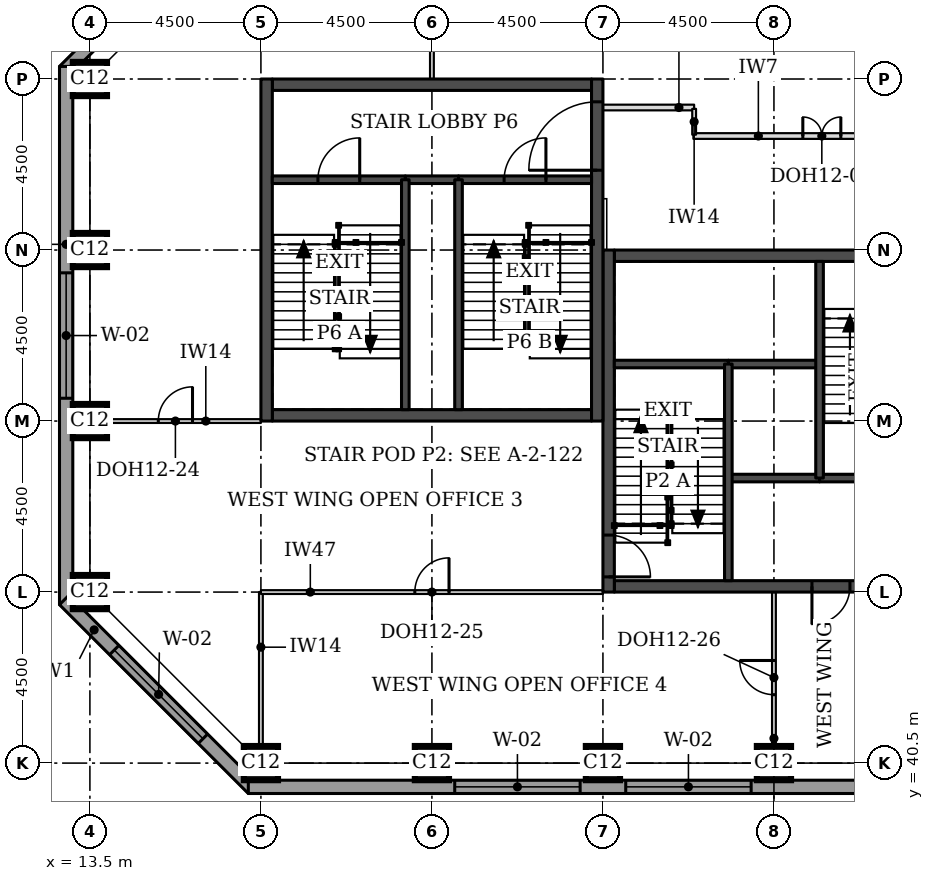
"""IFC4 building model, lengths in metres.
Left out: names, types, materials, properties, quantities, classifications, styles, units other than length and angle.
Written with IfcOpenShell. Run it as: python <this file> out.ifc"""

import sys

from ifc_helpers import new_model, si_unit, direction, frame, frame_2d, origin, origin_2d, place, context, subcontext, project, spatial, rectangle, extrude, element, fill, save


model = new_model("IFC4")
c1 = context("Model", 3, precision=1e-05, world=origin(), true_north=direction((0.0, 1.0)))
c2 = subcontext(c1, "Body", "Model", "MODEL_VIEW")
j1 = project(units=[si_unit("LENGTHUNIT", "METRE"), si_unit("PLANEANGLEUNIT", "RADIAN")], contexts=[c1])
p1 = place(None, origin())
s1 = spatial("IfcSite", under=j1, at=p1, CompositionType="ELEMENT")
p2 = place(p1, origin())
s2 = spatial("IfcBuilding", under=s1, at=p2, CompositionType="ELEMENT")
p3 = place(p2, frame((0.0, 0.0, 245.2)))
s3 = spatial("IfcBuildingStorey", under=s2, at=p3, CompositionType="ELEMENT", Elevation=245.2)
for number, where, z_axis, x_axis in (
    (1, (18.0, 40.5, 0.0), (0.0, 0.0, 1.0), (1.0, 0.0, 0.0)),
    (2, (22.5, 40.5, 0.0), (0.0, 0.0, 1.0), (1.0, 0.0, 0.0)),
    (3, (27.0, 40.5, 0.0), (0.0, 0.0, 1.0), (1.0, 0.0, 0.0)),
    (4, (31.5, 40.5, 0.0), (0.0, 0.0, 1.0), (1.0, 0.0, 0.0)),
    (5, (13.5, 45.0, 0.0), (0.0, 0.0, 1.0), (1.0, 0.0, 0.0)),
    (6, (13.5, 49.5, 0.0), (0.0, 0.0, 1.0), (1.0, 0.0, 0.0)),
    (7, (13.5, 54.0, 0.0), (0.0, 0.0, 1.0), (1.0, 0.0, 0.0)),
    (8, (13.5, 58.5, 0.0), (0.0, 0.0, 1.0), (1.0, 0.0, 0.0)),
):
    element("IfcColumn", number, at=place(p3, frame(where, z_axis=z_axis, x_axis=x_axis)), inside=s3, PredefinedType="COLUMN", context=c2, shape_type="SweptSolid", body=[
        extrude(rectangle(XDim=0.9, YDim=0.9, at=origin_2d()), origin(), (0.0, 0.0, 1.0), 3.7),
    ])
p4 = place(p3, frame((27.3, 45.15, 0.0), z_axis=(0.0, 0.0, 1.0), x_axis=(1.0, 0.0, 0.0)))
e9 = element("IfcWall", 9, at=p4, inside=s3, PredefinedType="SHEAR", context=c2, shape_type="SweptSolid", body=[
    extrude(rectangle(XDim=8.4, YDim=0.3, at=frame_2d((4.2, 0.0))), origin(), (0.0, 0.0, 1.0), 3.7),
])
p5 = place(p4, frame((5.2, 0.0, 0.0)))
e10 = element("IfcOpeningElement", 10, at=p5, cuts=e9, PredefinedType="OPENING", context=c2, shape_type="SweptSolid", body=[
    extrude(rectangle(XDim=1.0, YDim=2.1, at=frame_2d((0.5, 1.05))), frame((0.0, 0.16, 0.0), z_axis=(0.0, -1.0, 0.0), x_axis=(1.0, 0.0, 0.0)), (0.0, 0.0, 1.0), 0.32),
])
p6 = place(p3, frame((27.3, 53.85, 0.0), z_axis=(0.0, 0.0, 1.0), x_axis=(1.0, 0.0, 0.0)))
e11 = element("IfcWall", 11, at=p6, inside=s3, PredefinedType="SHEAR", context=c2, shape_type="SweptSolid", body=[
    extrude(rectangle(XDim=8.4, YDim=0.3, at=frame_2d((4.2, 0.0))), origin(), (0.0, 0.0, 1.0), 3.7),
])
p7 = place(p6, frame((6.4, 0.0, 0.0)))
e12 = element("IfcOpeningElement", 12, at=p7, cuts=e11, PredefinedType="OPENING", context=c2, shape_type="SweptSolid", body=[
    extrude(rectangle(XDim=1.1, YDim=2.1, at=frame_2d((0.55, 1.05))), frame((0.0, 0.16, 0.0), z_axis=(0.0, -1.0, 0.0), x_axis=(1.0, 0.0, 0.0)), (0.0, 0.0, 1.0), 0.32),
])
p8 = place(p3, frame((27.15, 45.0, 0.0), z_axis=(0.0, 0.0, 1.0), x_axis=(0.0, 1.0, 0.0)))
e13 = element("IfcWall", 13, at=p8, inside=s3, PredefinedType="SHEAR", context=c2, shape_type="SweptSolid", body=[
    extrude(rectangle(XDim=9.0, YDim=0.3, at=frame_2d((4.5, 0.0))), origin(), (0.0, 0.0, 1.0), 3.7),
])
p9 = place(p8, frame((0.4, 0.0, 0.0)))
e14 = element("IfcOpeningElement", 14, at=p9, cuts=e13, PredefinedType="OPENING", context=c2, shape_type="SweptSolid", body=[
    extrude(rectangle(XDim=1.1, YDim=2.1, at=frame_2d((0.55, 1.05))), frame((0.0, 0.16, 0.0), z_axis=(0.0, -1.0, 0.0), x_axis=(1.0, 0.0, 0.0)), (0.0, 0.0, 1.0), 0.32),
])
for number, where, z_axis, x_axis in (
    (15, (18.3, 49.65, 0.0), (0.0, 0.0, 1.0), (1.0, 0.0, 0.0)),
    (16, (18.3, 58.35, 0.0), (0.0, 0.0, 1.0), (1.0, 0.0, 0.0)),
):
    element("IfcWall", number, at=place(p3, frame(where, z_axis=z_axis, x_axis=x_axis)), inside=s3, PredefinedType="SHEAR", context=c2, shape_type="SweptSolid", body=[
        extrude(rectangle(XDim=8.4, YDim=0.3, at=frame_2d((4.2, 0.0))), origin(), (0.0, 0.0, 1.0), 3.7),
    ])
p10 = place(p3, frame((18.15, 49.5, 0.0), z_axis=(0.0, 0.0, 1.0), x_axis=(0.0, 1.0, 0.0)))
e17 = element("IfcWall", 17, at=p10, inside=s3, PredefinedType="SHEAR", context=c2, shape_type="SweptSolid", body=[
    extrude(rectangle(XDim=9.0, YDim=0.3, at=frame_2d((4.5, 0.0))), origin(), (0.0, 0.0, 1.0), 3.7),
])
p11 = place(p3, frame((26.85, 49.5, 0.0), z_axis=(0.0, 0.0, 1.0), x_axis=(0.0, 1.0, 0.0)))
e18 = element("IfcWall", 18, at=p11, inside=s3, PredefinedType="SHEAR", context=c2, shape_type="SweptSolid", body=[
    extrude(rectangle(XDim=9.0, YDim=0.3, at=frame_2d((4.5, 0.0))), origin(), (0.0, 0.0, 1.0), 3.7),
])
p12 = place(p11, frame((6.6, 0.0, 0.0)))
e19 = element("IfcOpeningElement", 19, at=p12, cuts=e18, PredefinedType="OPENING", context=c2, shape_type="SweptSolid", body=[
    extrude(rectangle(XDim=1.8, YDim=2.1, at=frame_2d((0.9, 1.05))), frame((0.0, 0.16, 0.0), z_axis=(0.0, -1.0, 0.0), x_axis=(1.0, 0.0, 0.0)), (0.0, 0.0, 1.0), 0.32),
])
p13 = place(p3, frame((17.792, 63.676, 0.0), z_axis=(0.0, 0.0, 1.0), x_axis=(-0.707106781187, -0.707106781187, 0.0)))
e20 = element("IfcWall", 20, at=p13, inside=s3, PredefinedType="STANDARD", context=c2, shape_type="SweptSolid", body=[
    extrude(rectangle(XDim=7.027, YDim=0.35, at=frame_2d((3.513, 0.0))), origin(), (0.0, 0.0, 1.0), 3.525),
])
p14 = place(p13, frame((1.863, 0.0, 0.9)))
e21 = element("IfcOpeningElement", 21, at=p14, cuts=e20, PredefinedType="OPENING", context=c2, shape_type="SweptSolid", body=[
    extrude(rectangle(XDim=3.3, YDim=1.9, at=frame_2d((1.65, 0.95))), frame((0.0, 0.185, 0.0), z_axis=(0.0, -1.0, 0.0), x_axis=(1.0, 0.0, 0.0)), (0.0, 0.0, 1.0), 0.37),
])
p15 = place(p3, frame((12.875, 58.831, 0.0), z_axis=(0.0, 0.0, 1.0), x_axis=(0.0, -1.0, 0.0)))
e22 = element("IfcWall", 22, at=p15, inside=s3, PredefinedType="STANDARD", context=c2, shape_type="SweptSolid", body=[
    extrude(rectangle(XDim=14.163, YDim=0.35, at=frame_2d((7.081, 0.0))), origin(), (0.0, 0.0, 1.0), 3.525),
])
p16 = place(p15, frame((5.431, 0.0, 0.9)))
e23 = element("IfcOpeningElement", 23, at=p16, cuts=e22, PredefinedType="OPENING", context=c2, shape_type="SweptSolid", body=[
    extrude(rectangle(XDim=3.3, YDim=1.9, at=frame_2d((1.65, 0.95))), frame((0.0, 0.185, 0.0), z_axis=(0.0, -1.0, 0.0), x_axis=(1.0, 0.0, 0.0)), (0.0, 0.0, 1.0), 0.37),
])
p17 = place(p3, frame((12.824, 44.792, 0.0), z_axis=(0.0, 0.0, 1.0), x_axis=(0.707106781187, -0.707106781187, 0.0)))
e24 = element("IfcWall", 24, at=p17, inside=s3, PredefinedType="STANDARD", context=c2, shape_type="SweptSolid", body=[
    extrude(rectangle(XDim=7.027, YDim=0.35, at=frame_2d((3.513, 0.0))), origin(), (0.0, 0.0, 1.0), 3.525),
])
p18 = place(p17, frame((1.863, 0.0, 0.9)))
e25 = element("IfcOpeningElement", 25, at=p18, cuts=e24, PredefinedType="OPENING", context=c2, shape_type="SweptSolid", body=[
    extrude(rectangle(XDim=3.3, YDim=1.9, at=frame_2d((1.65, 0.95))), frame((0.0, 0.185, 0.0), z_axis=(0.0, -1.0, 0.0), x_axis=(1.0, 0.0, 0.0)), (0.0, 0.0, 1.0), 0.37),
])
p19 = place(p3, frame((17.669, 39.875, 0.0), z_axis=(0.0, 0.0, 1.0), x_axis=(1.0, 0.0, 0.0)))
e26 = element("IfcWall", 26, at=p19, inside=s3, PredefinedType="STANDARD", context=c2, shape_type="SweptSolid", body=[
    extrude(rectangle(XDim=18.331, YDim=0.35, at=frame_2d((9.166, 0.0))), origin(), (0.0, 0.0, 1.0), 3.525),
])
p20 = place(p19, frame((5.431, 0.0, 0.9)))
e27 = element("IfcOpeningElement", 27, at=p20, cuts=e26, PredefinedType="OPENING", context=c2, shape_type="SweptSolid", body=[
    extrude(rectangle(XDim=3.3, YDim=1.9, at=frame_2d((1.65, 0.95))), frame((0.0, 0.185, 0.0), z_axis=(0.0, -1.0, 0.0), x_axis=(1.0, 0.0, 0.0)), (0.0, 0.0, 1.0), 0.37),
])
p21 = place(p19, frame((9.931, 0.0, 0.9)))
e28 = element("IfcOpeningElement", 28, at=p21, cuts=e26, PredefinedType="OPENING", context=c2, shape_type="SweptSolid", body=[
    extrude(rectangle(XDim=3.3, YDim=1.9, at=frame_2d((1.65, 0.95))), frame((0.0, 0.185, 0.0), z_axis=(0.0, -1.0, 0.0), x_axis=(1.0, 0.0, 0.0)), (0.0, 0.0, 1.0), 0.37),
])
p22 = place(p3, frame((29.38, 57.0, 0.0), z_axis=(0.0, 0.0, 1.0), x_axis=(1.0, 0.0, 0.0)))
e29 = element("IfcWall", 29, at=p22, inside=s3, PredefinedType="PARTITIONING", context=c2, shape_type="SweptSolid", body=[
    extrude(rectangle(XDim=6.62, YDim=0.15, at=frame_2d((3.31, 0.0))), origin(), (0.0, 0.0, 1.0), 3.55),
])
p23 = place(p22, frame((2.88, 0.0, 0.0)))
e30 = element("IfcOpeningElement", 30, at=p23, cuts=e29, PredefinedType="OPENING", context=c2, shape_type="SweptSolid", body=[
    extrude(rectangle(XDim=1.0, YDim=2.1, at=frame_2d((0.5, 1.05))), frame((0.0, 0.085, 0.0), z_axis=(0.0, -1.0, 0.0), x_axis=(1.0, 0.0, 0.0)), (0.0, 0.0, 1.0), 0.17),
])
p24 = place(p3, frame((22.5, 63.0, 0.0), z_axis=(0.0, 0.0, 1.0), x_axis=(0.0, -1.0, 0.0)))
e31 = element("IfcWall", 31, at=p24, inside=s3, PredefinedType="PARTITIONING", context=c2, shape_type="SweptSolid", body=[
    extrude(rectangle(XDim=4.5, YDim=0.1, at=frame_2d((2.25, 0.0))), origin(), (0.0, 0.0, 1.0), 3.55),
])
p25 = place(p24, frame((1.8, 0.0, 0.0)))
e32 = element("IfcOpeningElement", 32, at=p25, cuts=e31, PredefinedType="OPENING", context=c2, shape_type="SweptSolid", body=[
    extrude(rectangle(XDim=0.9, YDim=2.1, at=frame_2d((0.45, 1.05))), frame((0.0, 0.06, 0.0), z_axis=(0.0, -1.0, 0.0), x_axis=(1.0, 0.0, 0.0)), (0.0, 0.0, 1.0), 0.12),
])
p26 = place(p3, frame((13.5, 49.5, 0.0), z_axis=(0.0, 0.0, 1.0), x_axis=(1.0, 0.0, 0.0)))
e33 = element("IfcWall", 33, at=p26, inside=s3, PredefinedType="PARTITIONING", context=c2, shape_type="SweptSolid", body=[
    extrude(rectangle(XDim=4.5, YDim=0.1, at=frame_2d((2.25, 0.0))), origin(), (0.0, 0.0, 1.0), 3.55),
])
p27 = place(p26, frame((1.8, 0.0, 0.0)))
e34 = element("IfcOpeningElement", 34, at=p27, cuts=e33, PredefinedType="OPENING", context=c2, shape_type="SweptSolid", body=[
    extrude(rectangle(XDim=0.9, YDim=2.1, at=frame_2d((0.45, 1.05))), frame((0.0, 0.06, 0.0), z_axis=(0.0, -1.0, 0.0), x_axis=(1.0, 0.0, 0.0)), (0.0, 0.0, 1.0), 0.12),
])
p28 = place(p3, frame((18.0, 40.5, 0.0), z_axis=(0.0, 0.0, 1.0), x_axis=(0.0, 1.0, 0.0)))
e35 = element("IfcWall", 35, at=p28, inside=s3, PredefinedType="PARTITIONING", context=c2, shape_type="SweptSolid", body=[
    extrude(rectangle(XDim=4.5, YDim=0.1, at=frame_2d((2.25, 0.0))), origin(), (0.0, 0.0, 1.0), 3.55),
])
p29 = place(p3, frame((18.0, 45.0, 0.0), z_axis=(0.0, 0.0, 1.0), x_axis=(1.0, 0.0, 0.0)))
e36 = element("IfcWall", 36, at=p29, inside=s3, PredefinedType="PARTITIONING", context=c2, shape_type="SweptSolid", body=[
    extrude(rectangle(XDim=9.0, YDim=0.1, at=frame_2d((4.5, 0.0))), origin(), (0.0, 0.0, 1.0), 2.55),
])
p30 = place(p29, frame((4.05, 0.0, 0.0)))
e37 = element("IfcOpeningElement", 37, at=p30, cuts=e36, PredefinedType="OPENING", context=c2, shape_type="SweptSolid", body=[
    extrude(rectangle(XDim=0.9, YDim=2.1, at=frame_2d((0.45, 1.05))), frame((0.0, 0.06, 0.0), z_axis=(0.0, -1.0, 0.0), x_axis=(1.0, 0.0, 0.0)), (0.0, 0.0, 1.0), 0.12),
])
p31 = place(p3, frame((31.5, 45.0, 0.0), z_axis=(0.0, 0.0, 1.0), x_axis=(0.0, -1.0, 0.0)))
e38 = element("IfcWall", 38, at=p31, inside=s3, PredefinedType="PARTITIONING", context=c2, shape_type="SweptSolid", body=[
    extrude(rectangle(XDim=4.5, YDim=0.1, at=frame_2d((2.25, 0.0))), origin(), (0.0, 0.0, 1.0), 3.55),
])
p32 = place(p31, frame((1.8, 0.0, 0.0)))
e39 = element("IfcOpeningElement", 39, at=p32, cuts=e38, PredefinedType="OPENING", context=c2, shape_type="SweptSolid", body=[
    extrude(rectangle(XDim=0.9, YDim=2.1, at=frame_2d((0.45, 1.05))), frame((0.0, 0.06, 0.0), z_axis=(0.0, -1.0, 0.0), x_axis=(1.0, 0.0, 0.0)), (0.0, 0.0, 1.0), 0.12),
])
p33 = place(p3, frame((27.0, 57.75, 0.0), z_axis=(0.0, 0.0, 1.0), x_axis=(1.0, 0.0, 0.0)))
e40 = element("IfcWall", 40, at=p33, inside=s3, PredefinedType="PARTITIONING", context=c2, shape_type="SweptSolid", body=[
    extrude(rectangle(XDim=2.4, YDim=0.15, at=frame_2d((1.2, 0.0))), origin(), (0.0, 0.0, 1.0), 3.55),
])
p34 = place(p3, frame((29.4, 57.715, 0.0), z_axis=(0.0, 0.0, 1.0), x_axis=(0.0, -1.0, 0.0)))
e41 = element("IfcWall", 41, at=p34, inside=s3, PredefinedType="PARTITIONING", context=c2, shape_type="SweptSolid", body=[
    extrude(rectangle(XDim=0.68, YDim=0.1, at=frame_2d((0.34, 0.0))), origin(), (0.0, 0.0, 1.0), 3.55),
])
p35 = place(p3, frame((30.3, 48.0, 0.0), z_axis=(0.0, 0.0, 1.0), x_axis=(1.0, 0.0, 0.0)))
e42 = element("IfcWall", 42, at=p35, inside=s3, PredefinedType="SOLIDWALL", context=c2, shape_type="SweptSolid", body=[
    extrude(rectangle(XDim=2.4, YDim=0.2, at=frame_2d((1.2, 0.0))), origin(), (0.0, 0.0, 1.0), 3.55),
])
p36 = place(p3, frame((32.7, 48.0, 0.0), z_axis=(0.0, 0.0, 1.0), x_axis=(1.0, 0.0, 0.0)))
e43 = element("IfcWall", 43, at=p36, inside=s3, PredefinedType="SOLIDWALL", context=c2, shape_type="SweptSolid", body=[
    extrude(rectangle(XDim=3.0, YDim=0.2, at=frame_2d((1.5, 0.0))), origin(), (0.0, 0.0, 1.0), 3.55),
])
p37 = place(p3, frame((30.3, 51.0, 0.0), z_axis=(0.0, 0.0, 1.0), x_axis=(1.0, 0.0, 0.0)))
e44 = element("IfcWall", 44, at=p37, inside=s3, PredefinedType="SOLIDWALL", context=c2, shape_type="SweptSolid", body=[
    extrude(rectangle(XDim=2.4, YDim=0.2, at=frame_2d((1.2, 0.0))), origin(), (0.0, 0.0, 1.0), 3.7),
])
p38 = place(p3, frame((27.3, 51.0, 0.0), z_axis=(0.0, 0.0, 1.0), x_axis=(1.0, 0.0, 0.0)))
e45 = element("IfcWall", 45, at=p38, inside=s3, PredefinedType="SOLIDWALL", context=c2, shape_type="SweptSolid", body=[
    extrude(rectangle(XDim=3.0, YDim=0.2, at=frame_2d((1.5, 0.0))), origin(), (0.0, 0.0, 1.0), 3.55),
])
for number, where, z_axis, x_axis in (
    (46, (30.3, 45.3, 0.0), (0.0, 0.0, 1.0), (0.0, 1.0, 0.0)),
    (47, (32.7, 48.0, 0.0), (0.0, 0.0, 1.0), (0.0, 1.0, 0.0)),
):
    element("IfcWall", number, at=place(p3, frame(where, z_axis=z_axis, x_axis=x_axis)), inside=s3, PredefinedType="SOLIDWALL", context=c2, shape_type="SweptSolid", body=[
        extrude(rectangle(XDim=5.7, YDim=0.2, at=frame_2d((2.85, 0.0))), origin(), (0.0, 0.0, 1.0), 3.55),
    ])
p39 = place(p3, frame((21.8, 55.85, 0.0), z_axis=(0.0, 0.0, 1.0), x_axis=(1.0, 0.0, 0.0)))
e48 = element("IfcWall", 48, at=p39, inside=s3, PredefinedType="SOLIDWALL", context=c2, shape_type="SweptSolid", body=[
    extrude(rectangle(XDim=1.4, YDim=0.2, at=frame_2d((0.7, 0.0))), origin(), (0.0, 0.0, 1.0), 3.55),
])
p40 = place(p3, frame((18.3, 55.85, 0.0), z_axis=(0.0, 0.0, 1.0), x_axis=(1.0, 0.0, 0.0)))
e49 = element("IfcWall", 49, at=p40, inside=s3, PredefinedType="SOLIDWALL", context=c2, shape_type="SweptSolid", body=[
    extrude(rectangle(XDim=3.5, YDim=0.2, at=frame_2d((1.75, 0.0))), origin(), (0.0, 0.0, 1.0), 3.55),
])
p41 = place(p40, frame((1.2, 0.0, 0.0)))
e50 = element("IfcOpeningElement", 50, at=p41, cuts=e49, PredefinedType="OPENING", context=c2, shape_type="SweptSolid", body=[
    extrude(rectangle(XDim=1.1, YDim=2.1, at=frame_2d((0.55, 1.05))), frame((0.0, 0.11, 0.0), z_axis=(0.0, -1.0, 0.0), x_axis=(1.0, 0.0, 0.0)), (0.0, 0.0, 1.0), 0.22),
])
p42 = place(p3, frame((23.2, 55.85, 0.0), z_axis=(0.0, 0.0, 1.0), x_axis=(1.0, 0.0, 0.0)))
e51 = element("IfcWall", 51, at=p42, inside=s3, PredefinedType="SOLIDWALL", context=c2, shape_type="SweptSolid", body=[
    extrude(rectangle(XDim=3.5, YDim=0.2, at=frame_2d((1.75, 0.0))), origin(), (0.0, 0.0, 1.0), 3.55),
])
p43 = place(p42, frame((1.2, 0.0, 0.0)))
e52 = element("IfcOpeningElement", 52, at=p43, cuts=e51, PredefinedType="OPENING", context=c2, shape_type="SweptSolid", body=[
    extrude(rectangle(XDim=1.1, YDim=2.1, at=frame_2d((0.55, 1.05))), frame((0.0, 0.11, 0.0), z_axis=(0.0, -1.0, 0.0), x_axis=(1.0, 0.0, 0.0)), (0.0, 0.0, 1.0), 0.22),
])
for number, where, z_axis, x_axis in (
    (53, (21.8, 49.8, 0.0), (0.0, 0.0, 1.0), (0.0, 1.0, 0.0)),
    (54, (23.2, 49.8, 0.0), (0.0, 0.0, 1.0), (0.0, 1.0, 0.0)),
):
    element("IfcWall", number, at=place(p3, frame(where, z_axis=z_axis, x_axis=x_axis)), inside=s3, PredefinedType="SOLIDWALL", context=c2, shape_type="SweptSolid", body=[
        extrude(rectangle(XDim=6.05, YDim=0.2, at=frame_2d((3.025, 0.0))), origin(), (0.0, 0.0, 1.0), 3.55),
    ])
p44 = place(p16, origin())
e55 = element("IfcWindow", 55, at=p44, inside=s3, PartitioningType="SINGLE_PANEL", PredefinedType="WINDOW", context=c2, shape_type="SweptSolid", body=[
    extrude(rectangle(XDim=3.3, YDim=1.9, at=frame_2d((1.65, 0.95))), frame((0.0, 0.085, 0.0), z_axis=(0.0, -1.0, 0.0), x_axis=(1.0, 0.0, 0.0)), (0.0, 0.0, 1.0), 0.06),
])
fill(e23, e55)
p45 = place(p18, origin())
e56 = element("IfcWindow", 56, at=p45, inside=s3, PartitioningType="SINGLE_PANEL", PredefinedType="WINDOW", context=c2, shape_type="SweptSolid", body=[
    extrude(rectangle(XDim=3.3, YDim=1.9, at=frame_2d((1.65, 0.95))), frame((0.0, 0.085, 0.0), z_axis=(0.0, -1.0, 0.0), x_axis=(1.0, 0.0, 0.0)), (0.0, 0.0, 1.0), 0.06),
])
fill(e25, e56)
p46 = place(p20, origin())
e57 = element("IfcWindow", 57, at=p46, inside=s3, PartitioningType="SINGLE_PANEL", PredefinedType="WINDOW", context=c2, shape_type="SweptSolid", body=[
    extrude(rectangle(XDim=3.3, YDim=1.9, at=frame_2d((1.65, 0.95))), frame((0.0, 0.085, 0.0), z_axis=(0.0, -1.0, 0.0), x_axis=(1.0, 0.0, 0.0)), (0.0, 0.0, 1.0), 0.06),
])
fill(e27, e57)
p47 = place(p21, origin())
e58 = element("IfcWindow", 58, at=p47, inside=s3, PartitioningType="SINGLE_PANEL", PredefinedType="WINDOW", context=c2, shape_type="SweptSolid", body=[
    extrude(rectangle(XDim=3.3, YDim=1.9, at=frame_2d((1.65, 0.95))), frame((0.0, 0.085, 0.0), z_axis=(0.0, -1.0, 0.0), x_axis=(1.0, 0.0, 0.0)), (0.0, 0.0, 1.0), 0.06),
])
fill(e28, e58)
p48 = place(p23, origin())
e59 = element("IfcDoor", 59, at=p48, inside=s3, OperationType="DOUBLE_DOOR_SINGLE_SWING", PredefinedType="DOOR", context=c2, shape_type="SweptSolid", body=[
    extrude(rectangle(XDim=1.0, YDim=2.1, at=frame_2d((0.5, 1.05))), frame((0.0, 0.025, 0.0), z_axis=(0.0, -1.0, 0.0), x_axis=(1.0, 0.0, 0.0)), (0.0, 0.0, 1.0), 0.05),
])
fill(e30, e59)
p49 = place(p27, origin())
e60 = element("IfcDoor", 60, at=p49, inside=s3, OperationType="SINGLE_SWING_RIGHT", PredefinedType="DOOR", context=c2, shape_type="SweptSolid", body=[
    extrude(rectangle(XDim=0.9, YDim=2.1, at=frame_2d((0.45, 1.05))), frame((0.0, 0.025, 0.0), z_axis=(0.0, -1.0, 0.0), x_axis=(1.0, 0.0, 0.0)), (0.0, 0.0, 1.0), 0.05),
])
fill(e34, e60)
p50 = place(p30, origin())
e61 = element("IfcDoor", 61, at=p50, inside=s3, OperationType="SINGLE_SWING_RIGHT", PredefinedType="DOOR", context=c2, shape_type="SweptSolid", body=[
    extrude(rectangle(XDim=0.9, YDim=2.1, at=frame_2d((0.45, 1.05))), frame((0.0, 0.025, 0.0), z_axis=(0.0, -1.0, 0.0), x_axis=(1.0, 0.0, 0.0)), (0.0, 0.0, 1.0), 0.05),
])
fill(e37, e61)
p51 = place(p32, frame((0.9, 0.0, 0.0), z_axis=(0.0, 0.0, 1.0), x_axis=(-1.0, 0.0, 0.0)))
e62 = element("IfcDoor", 62, at=p51, inside=s3, OperationType="SINGLE_SWING_RIGHT", PredefinedType="DOOR", context=c2, shape_type="SweptSolid", body=[
    extrude(rectangle(XDim=0.9, YDim=2.1, at=frame_2d((0.45, 1.05))), frame((0.0, 0.025, 0.0), z_axis=(0.0, -1.0, 0.0), x_axis=(1.0, 0.0, 0.0)), (0.0, 0.0, 1.0), 0.05),
])
fill(e39, e62)
p52 = place(p9, frame((1.1, 0.0, 0.0), z_axis=(0.0, 0.0, 1.0), x_axis=(-1.0, 0.0, 0.0)))
e63 = element("IfcDoor", 63, at=p52, inside=s3, OperationType="SINGLE_SWING_RIGHT", PredefinedType="DOOR", context=c2, shape_type="SweptSolid", body=[
    extrude(rectangle(XDim=1.1, YDim=2.1, at=frame_2d((0.55, 1.05))), frame((0.0, 0.025, 0.0), z_axis=(0.0, -1.0, 0.0), x_axis=(1.0, 0.0, 0.0)), (0.0, 0.0, 1.0), 0.05),
])
fill(e14, e63)
p53 = place(p5, frame((1.0, 0.0, 0.0), z_axis=(0.0, 0.0, 1.0), x_axis=(-1.0, 0.0, 0.0)))
e64 = element("IfcDoor", 64, at=p53, inside=s3, OperationType="SINGLE_SWING_RIGHT", PredefinedType="DOOR", context=c2, shape_type="SweptSolid", body=[
    extrude(rectangle(XDim=1.0, YDim=2.1, at=frame_2d((0.5, 1.05))), frame((0.0, 0.025, 0.0), z_axis=(0.0, -1.0, 0.0), x_axis=(1.0, 0.0, 0.0)), (0.0, 0.0, 1.0), 0.05),
])
fill(e10, e64)
p54 = place(p41, origin())
e65 = element("IfcDoor", 65, at=p54, inside=s3, OperationType="SINGLE_SWING_RIGHT", PredefinedType="DOOR", context=c2, shape_type="SweptSolid", body=[
    extrude(rectangle(XDim=1.1, YDim=2.1, at=frame_2d((0.55, 1.05))), frame((0.0, 0.025, 0.0), z_axis=(0.0, -1.0, 0.0), x_axis=(1.0, 0.0, 0.0)), (0.0, 0.0, 1.0), 0.05),
])
fill(e50, e65)
p55 = place(p43, origin())
e66 = element("IfcDoor", 66, at=p55, inside=s3, OperationType="SINGLE_SWING_RIGHT", PredefinedType="DOOR", context=c2, shape_type="SweptSolid", body=[
    extrude(rectangle(XDim=1.1, YDim=2.1, at=frame_2d((0.55, 1.05))), frame((0.0, 0.025, 0.0), z_axis=(0.0, -1.0, 0.0), x_axis=(1.0, 0.0, 0.0)), (0.0, 0.0, 1.0), 0.05),
])
fill(e52, e66)
p56 = place(p12, origin())
e67 = element("IfcDoor", 67, at=p56, inside=s3, OperationType="SINGLE_SWING_LEFT", PredefinedType="DOOR", context=c2, shape_type="SweptSolid", body=[
    extrude(rectangle(XDim=1.8, YDim=2.1, at=frame_2d((0.9, 1.05))), frame((0.0, 0.025, 0.0), z_axis=(0.0, -1.0, 0.0), x_axis=(1.0, 0.0, 0.0)), (0.0, 0.0, 1.0), 0.05),
])
fill(e19, e67)
save(model, sys.argv[1])
